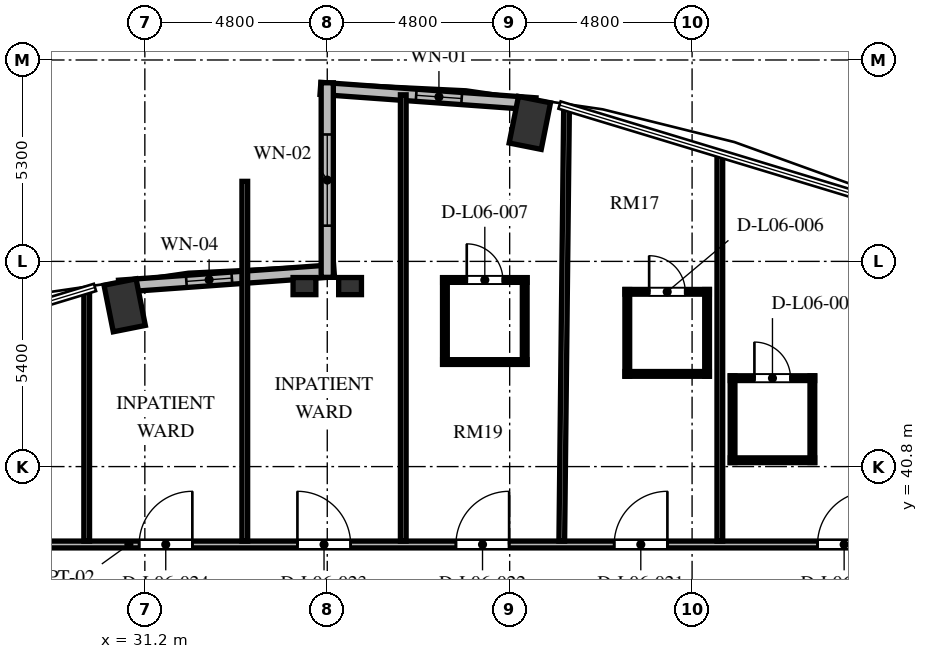
"""IFC4 building model, lengths in metres.
Left out: names, types, materials, properties, quantities, classifications, styles, units other than length and angle.
Written with IfcOpenShell. Run it as: python <this file> out.ifc"""

import sys

from ifc_helpers import new_model, si_unit, direction, frame, frame_2d, origin, origin_2d, place, context, subcontext, project, spatial, rectangle, extrude, element, fill, save


model = new_model("IFC4")
c1 = context("Model", 3, precision=1e-05, world=origin(), true_north=direction((0.0, 1.0)))
c2 = subcontext(c1, "Body", "Model", "MODEL_VIEW")
j1 = project(units=[si_unit("LENGTHUNIT", "METRE"), si_unit("PLANEANGLEUNIT", "RADIAN")], contexts=[c1])
p1 = place(None, origin())
s1 = spatial("IfcSite", under=j1, at=p1, CompositionType="ELEMENT")
p2 = place(p1, origin())
s2 = spatial("IfcBuilding", under=s1, at=p2, CompositionType="ELEMENT")
p3 = place(p2, frame((0.0, 0.0, 28.848)))
s3 = spatial("IfcBuildingStorey", under=s2, at=p3, CompositionType="ELEMENT", Elevation=28.848)
for number, where, z_axis, x_axis in (
    (1, (41.331, 49.844, 0.0), (0.0, 0.0, 1.0), (0.195, 0.981, 0.0)),
    (2, (30.669, 45.044, 0.0), (0.0, 0.0, 1.0), (-0.195, 0.981, 0.0)),
):
    element("IfcColumn", number, at=place(p3, frame(where, z_axis=z_axis, x_axis=x_axis)), inside=s3, PredefinedType="COLUMN", context=c2, shape_type="SweptSolid", body=[
        extrude(rectangle(XDim=1.25, YDim=0.86, at=origin_2d()), origin(), (0.0, 0.0, 1.0), 3.648),
    ])
for number, where, z_axis, x_axis in (
    (3, (35.4, 45.55, 0.0), (0.0, 0.0, 1.0), (1.0, 0.0, 0.0)),
    (4, (36.6, 45.55, 0.0), (0.0, 0.0, 1.0), (1.0, 0.0, 0.0)),
):
    element("IfcColumn", number, at=place(p3, frame(where, z_axis=z_axis, x_axis=x_axis)), inside=s3, PredefinedType="PILASTER", context=c2, shape_type="SweptSolid", body=[
        extrude(rectangle(XDim=0.6, YDim=0.45, at=origin_2d()), origin(), (0.0, 0.0, 1.0), 3.648),
    ])
p4 = place(p3, frame((41.481, 50.346, 0.0), z_axis=(0.0, 0.0, 1.0), x_axis=(-0.997422321809, 0.071754525696, 0.0)))
e5 = element("IfcWall", 5, at=p4, inside=s3, PredefinedType="SOLIDWALL", context=c2, shape_type="SweptSolid", body=[
    extrude(rectangle(XDim=5.675, YDim=0.32, at=frame_2d((2.838, 0.0))), origin(), (0.0, 0.0, 1.0), 3.428),
])
p5 = place(p4, frame((1.949, 0.0, 0.85)))
e6 = element("IfcOpeningElement", 6, at=p5, cuts=e5, PredefinedType="OPENING", context=c2, shape_type="SweptSolid", body=[
    extrude(rectangle(XDim=1.2, YDim=2.2, at=frame_2d((0.6, 1.1))), frame((0.0, 0.17, 0.0), z_axis=(0.0, -1.0, 0.0), x_axis=(1.0, 0.0, 0.0)), (0.0, 0.0, 1.0), 0.34),
])
p6 = place(p3, frame((36.179, 45.953, 0.0), z_axis=(0.0, 0.0, 1.0), x_axis=(-0.997421878774, -0.071760683825, 0.0)))
e7 = element("IfcWall", 7, at=p6, inside=s3, PredefinedType="SOLIDWALL", context=c2, shape_type="SweptSolid", body=[
    extrude(rectangle(XDim=5.675, YDim=0.32, at=frame_2d((2.837, 0.0))), origin(), (0.0, 0.0, 1.0), 3.428),
])
p7 = place(p6, frame((2.696, 0.0, 0.85)))
e8 = element("IfcOpeningElement", 8, at=p7, cuts=e7, PredefinedType="OPENING", context=c2, shape_type="SweptSolid", body=[
    extrude(rectangle(XDim=1.2, YDim=1.8, at=frame_2d((0.6, 0.9))), frame((0.0, 0.17, 0.0), z_axis=(0.0, -1.0, 0.0), x_axis=(1.0, 0.0, 0.0)), (0.0, 0.0, 1.0), 0.34),
])
p8 = place(p3, frame((36.0, 50.9, 0.0), z_axis=(0.0, 0.0, 1.0), x_axis=(0.0, -1.0, 0.0)))
e9 = element("IfcWall", 9, at=p8, inside=s3, PredefinedType="SOLIDWALL", context=c2, shape_type="SweptSolid", body=[
    extrude(rectangle(XDim=5.12, YDim=0.32, at=frame_2d((2.56, 0.0))), origin(), (0.0, 0.0, 1.0), 3.428),
])
p9 = place(p8, frame((1.36, 0.0, 0.84)))
e10 = element("IfcOpeningElement", 10, at=p9, cuts=e9, PredefinedType="OPENING", context=c2, shape_type="SweptSolid", body=[
    extrude(rectangle(XDim=2.4, YDim=2.04, at=frame_2d((1.2, 1.02))), frame((0.0, 0.17, 0.0), z_axis=(0.0, -1.0, 0.0), x_axis=(1.0, 0.0, 0.0)), (0.0, 0.0, 1.0), 0.34),
])
p10 = place(p3, frame((23.31, 38.75, 0.0), z_axis=(0.0, 0.0, 1.0), x_axis=(1.0, 0.0, 0.0)))
e11 = element("IfcWall", 11, at=p10, inside=s3, PredefinedType="PARTITIONING", context=c2, shape_type="SweptSolid", body=[
    extrude(rectangle(XDim=29.88, YDim=0.18, at=frame_2d((14.94, 0.0))), origin(), (0.0, 0.0, 1.0), 3.053),
])
p11 = place(p10, frame((25.591, 0.0, 0.0)))
e12 = element("IfcOpeningElement", 12, at=p11, cuts=e11, PredefinedType="OPENING", context=c2, shape_type="SweptSolid", body=[
    extrude(rectangle(XDim=1.4, YDim=2.2, at=frame_2d((0.7, 1.1))), frame((0.0, 0.1, 0.0), z_axis=(0.0, -1.0, 0.0), x_axis=(1.0, 0.0, 0.0)), (0.0, 0.0, 1.0), 0.2),
])
p12 = place(p10, frame((20.24, 0.0, 0.0)))
e13 = element("IfcOpeningElement", 13, at=p12, cuts=e11, PredefinedType="OPENING", context=c2, shape_type="SweptSolid", body=[
    extrude(rectangle(XDim=1.4, YDim=2.2, at=frame_2d((0.7, 1.1))), frame((0.0, 0.1, 0.0), z_axis=(0.0, -1.0, 0.0), x_axis=(1.0, 0.0, 0.0)), (0.0, 0.0, 1.0), 0.2),
])
p13 = place(p10, frame((16.075, 0.0, 0.0)))
e14 = element("IfcOpeningElement", 14, at=p13, cuts=e11, PredefinedType="OPENING", context=c2, shape_type="SweptSolid", body=[
    extrude(rectangle(XDim=1.4, YDim=2.2, at=frame_2d((0.7, 1.1))), frame((0.0, 0.1, 0.0), z_axis=(0.0, -1.0, 0.0), x_axis=(1.0, 0.0, 0.0)), (0.0, 0.0, 1.0), 0.2),
])
p14 = place(p10, frame((11.905, 0.0, 0.0)))
e15 = element("IfcOpeningElement", 15, at=p14, cuts=e11, PredefinedType="OPENING", context=c2, shape_type="SweptSolid", body=[
    extrude(rectangle(XDim=1.4, YDim=2.2, at=frame_2d((0.7, 1.1))), frame((0.0, 0.1, 0.0), z_axis=(0.0, -1.0, 0.0), x_axis=(1.0, 0.0, 0.0)), (0.0, 0.0, 1.0), 0.2),
])
p15 = place(p10, frame((7.74, 0.0, 0.0)))
e16 = element("IfcOpeningElement", 16, at=p15, cuts=e11, PredefinedType="OPENING", context=c2, shape_type="SweptSolid", body=[
    extrude(rectangle(XDim=1.4, YDim=2.2, at=frame_2d((0.7, 1.1))), frame((0.0, 0.1, 0.0), z_axis=(0.0, -1.0, 0.0), x_axis=(1.0, 0.0, 0.0)), (0.0, 0.0, 1.0), 0.2),
])
p16 = place(p10, frame((2.639, 0.0, 0.0)))
e17 = element("IfcOpeningElement", 17, at=p16, cuts=e11, PredefinedType="OPENING", context=c2, shape_type="SweptSolid", body=[
    extrude(rectangle(XDim=1.4, YDim=2.2, at=frame_2d((0.7, 1.1))), frame((0.0, 0.1, 0.0), z_axis=(0.0, -1.0, 0.0), x_axis=(1.0, 0.0, 0.0)), (0.0, 0.0, 1.0), 0.2),
])
p17 = place(p3, frame((29.67, 38.84, 0.0), z_axis=(0.0, 0.0, 1.0), x_axis=(0.0, 1.0, 0.0)))
e18 = element("IfcWall", 18, at=p17, inside=s3, PredefinedType="PARTITIONING", context=c2, shape_type="SweptSolid", body=[
    extrude(rectangle(XDim=6.596, YDim=0.15, at=frame_2d((3.298, 0.0))), origin(), (0.0, 0.0, 1.0), 3.428),
])
p18 = place(p3, frame((33.83, 38.84, 0.0), z_axis=(0.0, 0.0, 1.0), x_axis=(0.0, 1.0, 0.0)))
e19 = element("IfcWall", 19, at=p18, inside=s3, PredefinedType="PARTITIONING", context=c2, shape_type="SweptSolid", body=[
    extrude(rectangle(XDim=9.466, YDim=0.15, at=frame_2d((4.733, 0.0))), origin(), (0.0, 0.0, 1.0), 3.428),
])
p19 = place(p3, frame((38.0, 38.84, 0.0), z_axis=(0.0, 0.0, 1.0), x_axis=(0.0, 1.0, 0.0)))
e20 = element("IfcWall", 20, at=p19, inside=s3, PredefinedType="PARTITIONING", context=c2, shape_type="SweptSolid", body=[
    extrude(rectangle(XDim=11.743, YDim=0.15, at=frame_2d((5.872, 0.0))), origin(), (0.0, 0.0, 1.0), 3.428),
])
p20 = place(p3, frame((42.171, 38.84, 0.0), z_axis=(0.0, 0.0, 1.0), x_axis=(0.010986468696, 0.999939646932, 0.0)))
e21 = element("IfcWall", 21, at=p20, inside=s3, PredefinedType="PARTITIONING", context=c2, shape_type="SweptSolid", body=[
    extrude(rectangle(XDim=11.422, YDim=0.15, at=frame_2d((5.711, 0.0))), origin(), (0.0, 0.0, 1.0), 3.428),
])
p21 = place(p3, frame((46.33, 38.84, 0.0), z_axis=(0.0, 0.0, 1.0), x_axis=(0.0, 1.0, 0.0)))
e22 = element("IfcWall", 22, at=p21, inside=s3, PredefinedType="PARTITIONING", context=c2, shape_type="SweptSolid", body=[
    extrude(rectangle(XDim=10.185, YDim=0.15, at=frame_2d((5.092, 0.0))), origin(), (0.0, 0.0, 1.0), 3.428),
])
p22 = place(p3, frame((46.605, 43.127, 0.0), z_axis=(0.0, 0.0, 1.0), x_axis=(1.0, 0.0, 0.0)))
e23 = element("IfcWall", 23, at=p22, inside=s3, PredefinedType="PARTITIONING", context=c2, shape_type="SweptSolid", body=[
    extrude(rectangle(XDim=2.22, YDim=0.125, at=frame_2d((1.11, 0.0))), origin(), (0.0, 0.0, 1.0), 3.428),
])
p23 = place(p22, frame((0.635, 0.0, 0.0)))
e24 = element("IfcOpeningElement", 24, at=p23, cuts=e23, PredefinedType="OPENING", context=c2, shape_type="SweptSolid", body=[
    extrude(rectangle(XDim=0.95, YDim=2.1, at=frame_2d((0.475, 1.05))), frame((0.0, 0.073, 0.0), z_axis=(0.0, -1.0, 0.0), x_axis=(1.0, 0.0, 0.0)), (0.0, 0.0, 1.0), 0.145),
])
p24 = place(p3, frame((46.605, 40.967, 0.0), z_axis=(0.0, 0.0, 1.0), x_axis=(1.0, 0.0, 0.0)))
e25 = element("IfcWall", 25, at=p24, inside=s3, PredefinedType="PARTITIONING", context=c2, shape_type="SweptSolid", body=[
    extrude(rectangle(XDim=2.22, YDim=0.125, at=frame_2d((1.11, 0.0))), origin(), (0.0, 0.0, 1.0), 3.428),
])
for number, where, z_axis, x_axis in (
    (26, (48.765, 40.907, 0.0), (0.0, 0.0, 1.0), (0.0, 1.0, 0.0)),
    (27, (46.665, 40.907, 0.0), (0.0, 0.0, 1.0), (0.0, 1.0, 0.0)),
):
    element("IfcWall", number, at=place(p3, frame(where, z_axis=z_axis, x_axis=x_axis)), inside=s3, PredefinedType="PARTITIONING", context=c2, shape_type="SweptSolid", body=[
        extrude(rectangle(XDim=2.28, YDim=0.125, at=frame_2d((1.14, 0.0))), origin(), (0.0, 0.0, 1.0), 3.428),
    ])
p25 = place(p3, frame((43.835, 45.399, 0.0), z_axis=(0.0, 0.0, 1.0), x_axis=(1.0, 0.0, 0.0)))
e28 = element("IfcWall", 28, at=p25, inside=s3, PredefinedType="PARTITIONING", context=c2, shape_type="SweptSolid", body=[
    extrude(rectangle(XDim=2.22, YDim=0.125, at=frame_2d((1.11, 0.0))), origin(), (0.0, 0.0, 1.0), 3.013),
])
p26 = place(p25, frame((0.635, 0.0, 0.0)))
e29 = element("IfcOpeningElement", 29, at=p26, cuts=e28, PredefinedType="OPENING", context=c2, shape_type="SweptSolid", body=[
    extrude(rectangle(XDim=0.95, YDim=2.1, at=frame_2d((0.475, 1.05))), frame((0.0, 0.073, 0.0), z_axis=(0.0, -1.0, 0.0), x_axis=(1.0, 0.0, 0.0)), (0.0, 0.0, 1.0), 0.145),
])
p27 = place(p3, frame((43.835, 43.239, 0.0), z_axis=(0.0, 0.0, 1.0), x_axis=(1.0, 0.0, 0.0)))
e30 = element("IfcWall", 30, at=p27, inside=s3, PredefinedType="PARTITIONING", context=c2, shape_type="SweptSolid", body=[
    extrude(rectangle(XDim=2.22, YDim=0.125, at=frame_2d((1.11, 0.0))), origin(), (0.0, 0.0, 1.0), 3.053),
])
for number, where, z_axis, x_axis in (
    (31, (45.995, 43.179, 0.0), (0.0, 0.0, 1.0), (0.0, 1.0, 0.0)),
    (32, (43.895, 43.179, 0.0), (0.0, 0.0, 1.0), (0.0, 1.0, 0.0)),
):
    element("IfcWall", number, at=place(p3, frame(where, z_axis=z_axis, x_axis=x_axis)), inside=s3, PredefinedType="PARTITIONING", context=c2, shape_type="SweptSolid", body=[
        extrude(rectangle(XDim=2.28, YDim=0.125, at=frame_2d((1.14, 0.0))), origin(), (0.0, 0.0, 1.0), 3.428),
    ])
p28 = place(p3, frame((39.036, 45.711, 0.0), z_axis=(0.0, 0.0, 1.0), x_axis=(1.0, 0.0, 0.0)))
e33 = element("IfcWall", 33, at=p28, inside=s3, PredefinedType="PARTITIONING", context=c2, shape_type="SweptSolid", body=[
    extrude(rectangle(XDim=2.22, YDim=0.125, at=frame_2d((1.11, 0.0))), origin(), (0.0, 0.0, 1.0), 3.428),
])
p29 = place(p28, frame((0.635, 0.0, 0.0)))
e34 = element("IfcOpeningElement", 34, at=p29, cuts=e33, PredefinedType="OPENING", context=c2, shape_type="SweptSolid", body=[
    extrude(rectangle(XDim=0.95, YDim=2.1, at=frame_2d((0.475, 1.05))), frame((0.0, 0.073, 0.0), z_axis=(0.0, -1.0, 0.0), x_axis=(1.0, 0.0, 0.0)), (0.0, 0.0, 1.0), 0.145),
])
p30 = place(p3, frame((39.036, 43.551, 0.0), z_axis=(0.0, 0.0, 1.0), x_axis=(1.0, 0.0, 0.0)))
e35 = element("IfcWall", 35, at=p30, inside=s3, PredefinedType="PARTITIONING", context=c2, shape_type="SweptSolid", body=[
    extrude(rectangle(XDim=2.22, YDim=0.125, at=frame_2d((1.11, 0.0))), origin(), (0.0, 0.0, 1.0), 3.428),
])
for number, where, z_axis, x_axis in (
    (36, (41.196, 43.491, 0.0), (0.0, 0.0, 1.0), (0.0, 1.0, 0.0)),
    (37, (39.096, 43.491, 0.0), (0.0, 0.0, 1.0), (0.0, 1.0, 0.0)),
):
    element("IfcWall", number, at=place(p3, frame(where, z_axis=z_axis, x_axis=x_axis)), inside=s3, PredefinedType="PARTITIONING", context=c2, shape_type="SweptSolid", body=[
        extrude(rectangle(XDim=2.28, YDim=0.125, at=frame_2d((1.14, 0.0))), origin(), (0.0, 0.0, 1.0), 3.428),
    ])
p31 = place(p5, origin())
e38 = element("IfcWindow", 38, at=p31, inside=s3, PartitioningType="SINGLE_PANEL", PredefinedType="WINDOW", context=c2, shape_type="SweptSolid", body=[
    extrude(rectangle(XDim=1.2, YDim=2.2, at=frame_2d((0.6, 1.1))), frame((0.0, 0.03, 0.0), z_axis=(0.0, -1.0, 0.0), x_axis=(1.0, 0.0, 0.0)), (0.0, 0.0, 1.0), 0.06),
])
fill(e6, e38)
p32 = place(p7, origin())
e39 = element("IfcWindow", 39, at=p32, inside=s3, PartitioningType="SINGLE_PANEL", PredefinedType="WINDOW", context=c2, shape_type="SweptSolid", body=[
    extrude(rectangle(XDim=1.2, YDim=1.8, at=frame_2d((0.6, 0.9))), frame((0.0, 0.03, 0.0), z_axis=(0.0, -1.0, 0.0), x_axis=(1.0, 0.0, 0.0)), (0.0, 0.0, 1.0), 0.06),
])
fill(e8, e39)
p33 = place(p9, origin())
e40 = element("IfcWindow", 40, at=p33, inside=s3, PartitioningType="SINGLE_PANEL", PredefinedType="WINDOW", context=c2, shape_type="SweptSolid", body=[
    extrude(rectangle(XDim=2.4, YDim=2.04, at=frame_2d((1.2, 1.02))), frame((0.0, 0.03, 0.0), z_axis=(0.0, -1.0, 0.0), x_axis=(1.0, 0.0, 0.0)), (0.0, 0.0, 1.0), 0.06),
])
fill(e10, e40)
p34 = place(p23, origin())
e41 = element("IfcDoor", 41, at=p34, inside=s3, OperationType="SINGLE_SWING_LEFT", PredefinedType="DOOR", context=c2, shape_type="SweptSolid", body=[
    extrude(rectangle(XDim=0.95, YDim=2.1, at=frame_2d((0.475, 1.05))), frame((0.0, 0.025, 0.0), z_axis=(0.0, -1.0, 0.0), x_axis=(1.0, 0.0, 0.0)), (0.0, 0.0, 1.0), 0.05),
])
fill(e24, e41)
p35 = place(p11, origin())
e42 = element("IfcDoor", 42, at=p35, inside=s3, OperationType="SINGLE_SWING_RIGHT", PredefinedType="DOOR", context=c2, shape_type="SweptSolid", body=[
    extrude(rectangle(XDim=1.4, YDim=2.2, at=frame_2d((0.7, 1.1))), frame((0.0, 0.025, 0.0), z_axis=(0.0, -1.0, 0.0), x_axis=(1.0, 0.0, 0.0)), (0.0, 0.0, 1.0), 0.05),
])
fill(e12, e42)
p36 = place(p26, origin())
e43 = element("IfcDoor", 43, at=p36, inside=s3, OperationType="SINGLE_SWING_LEFT", PredefinedType="DOOR", context=c2, shape_type="SweptSolid", body=[
    extrude(rectangle(XDim=0.95, YDim=2.1, at=frame_2d((0.475, 1.05))), frame((0.0, 0.025, 0.0), z_axis=(0.0, -1.0, 0.0), x_axis=(1.0, 0.0, 0.0)), (0.0, 0.0, 1.0), 0.05),
])
fill(e29, e43)
p37 = place(p12, origin())
e44 = element("IfcDoor", 44, at=p37, inside=s3, OperationType="SINGLE_SWING_RIGHT", PredefinedType="DOOR", context=c2, shape_type="SweptSolid", body=[
    extrude(rectangle(XDim=1.4, YDim=2.2, at=frame_2d((0.7, 1.1))), frame((0.0, 0.025, 0.0), z_axis=(0.0, -1.0, 0.0), x_axis=(1.0, 0.0, 0.0)), (0.0, 0.0, 1.0), 0.05),
])
fill(e13, e44)
p38 = place(p29, origin())
e45 = element("IfcDoor", 45, at=p38, inside=s3, OperationType="SINGLE_SWING_LEFT", PredefinedType="DOOR", context=c2, shape_type="SweptSolid", body=[
    extrude(rectangle(XDim=0.95, YDim=2.1, at=frame_2d((0.475, 1.05))), frame((0.0, 0.025, 0.0), z_axis=(0.0, -1.0, 0.0), x_axis=(1.0, 0.0, 0.0)), (0.0, 0.0, 1.0), 0.05),
])
fill(e34, e45)
p39 = place(p13, origin())
e46 = element("IfcDoor", 46, at=p39, inside=s3, OperationType="SINGLE_SWING_RIGHT", PredefinedType="DOOR", context=c2, shape_type="SweptSolid", body=[
    extrude(rectangle(XDim=1.4, YDim=2.2, at=frame_2d((0.7, 1.1))), frame((0.0, 0.025, 0.0), z_axis=(0.0, -1.0, 0.0), x_axis=(1.0, 0.0, 0.0)), (0.0, 0.0, 1.0), 0.05),
])
fill(e14, e46)
p40 = place(p14, origin())
e47 = element("IfcDoor", 47, at=p40, inside=s3, OperationType="SINGLE_SWING_LEFT", PredefinedType="DOOR", context=c2, shape_type="SweptSolid", body=[
    extrude(rectangle(XDim=1.4, YDim=2.2, at=frame_2d((0.7, 1.1))), frame((0.0, 0.025, 0.0), z_axis=(0.0, -1.0, 0.0), x_axis=(1.0, 0.0, 0.0)), (0.0, 0.0, 1.0), 0.05),
])
fill(e15, e47)
p41 = place(p15, origin())
e48 = element("IfcDoor", 48, at=p41, inside=s3, OperationType="SINGLE_SWING_RIGHT", PredefinedType="DOOR", context=c2, shape_type="SweptSolid", body=[
    extrude(rectangle(XDim=1.4, YDim=2.2, at=frame_2d((0.7, 1.1))), frame((0.0, 0.025, 0.0), z_axis=(0.0, -1.0, 0.0), x_axis=(1.0, 0.0, 0.0)), (0.0, 0.0, 1.0), 0.05),
])
fill(e16, e48)
save(model, sys.argv[1])
